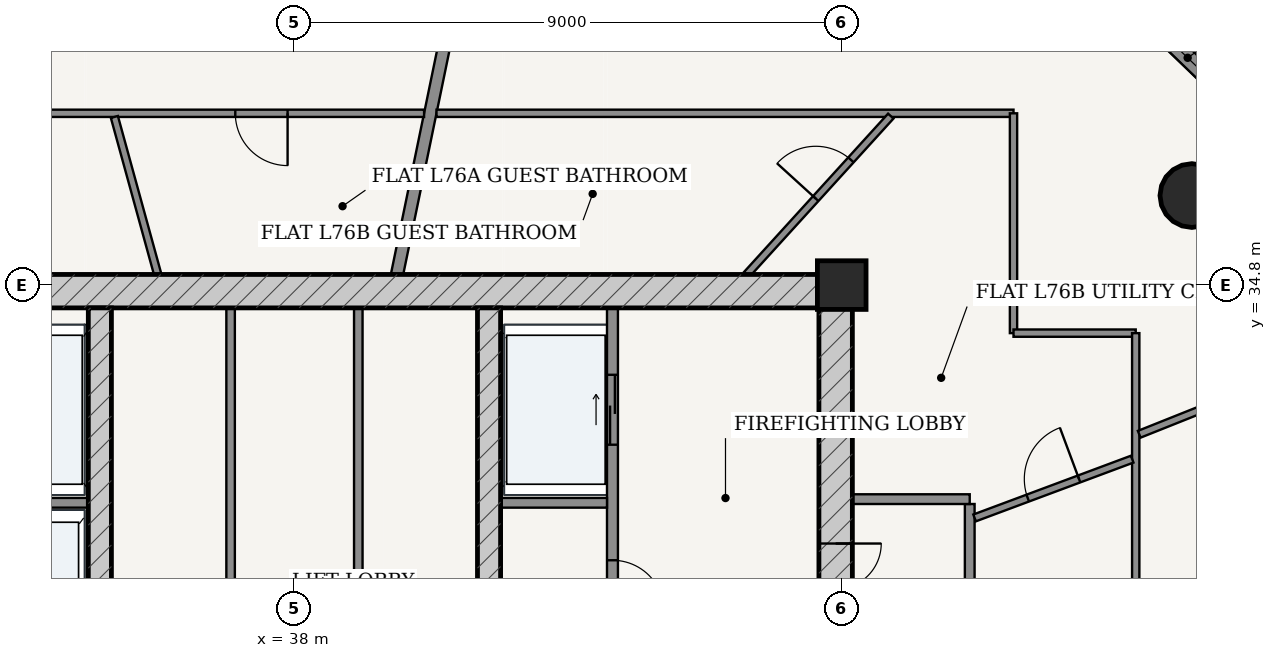
"""IFC4 building model, lengths in metres.
Left out: names, types, materials, properties, quantities, classifications, styles, units other than length and angle.
Written with IfcOpenShell. Run it as: python <this file> out.ifc"""

import sys

from ifc_helpers import new_model, si_unit, direction, frame, frame_2d, origin, origin_2d, place, context, subcontext, project, spatial, rectangle, hollow_circle, extrude, source, transform, mapped, element, fill, save


model = new_model("IFC4")
c1 = context("Model", 3, precision=1e-05, world=origin(), true_north=direction((-0.2419218956, 0.970295726276)))
c2 = subcontext(c1, "Body", "Model", "MODEL_VIEW")
j1 = project(units=[si_unit("LENGTHUNIT", "METRE"), si_unit("PLANEANGLEUNIT", "RADIAN")], contexts=[c1])
p1 = place(None, origin())
s1 = spatial("IfcSite", under=j1, at=p1, CompositionType="ELEMENT")
p2 = place(p1, origin())
s2 = spatial("IfcBuilding", under=s1, at=p2, CompositionType="ELEMENT")
p3 = place(p2, frame((0.0, 0.0, 289.45)))
s3 = spatial("IfcBuildingStorey", under=s2, at=p3, CompositionType="ELEMENT", Elevation=289.45)
p4 = place(p3, frame((47.0, 34.8, 0.0), z_axis=(0.0, 0.0, 1.0), x_axis=(1.0, 0.0, 0.0)))
e1 = element("IfcColumn", 1, at=p4, inside=s3, PredefinedType="COLUMN", context=c2, shape_type="SweptSolid", body=[
    extrude(rectangle(XDim=0.8, YDim=0.8, at=origin_2d()), origin(), (0.0, 0.0, 1.0), 3.75),
])
p5 = place(p3, frame((28.825, 34.7, 0.0), z_axis=(0.0, 0.0, 1.0), x_axis=(1.0, 0.0, 0.0)))
e2 = element("IfcWall", 2, at=p5, inside=s3, PredefinedType="SHEAR", context=c2, shape_type="SweptSolid", body=[
    extrude(rectangle(XDim=18.35, YDim=0.55, at=frame_2d((9.175, 0.0))), origin(), (0.0, 0.0, 1.0), 3.49),
])
p6 = place(p3, frame((46.9, 19.175, 0.0), z_axis=(0.0, 0.0, 1.0), x_axis=(0.0, 1.0, 0.0)))
e3 = element("IfcWall", 3, at=p6, inside=s3, PredefinedType="SHEAR", context=c2, shape_type="SweptSolid", body=[
    extrude(rectangle(XDim=15.25, YDim=0.55, at=frame_2d((7.625, 0.0))), origin(), (0.0, 0.0, 1.0), 3.49),
])
p7 = place(p6, frame((9.875, 0.0, 0.0)))
e4 = element("IfcOpeningElement", 4, at=p7, cuts=e3, PredefinedType="OPENING", context=c2, shape_type="SweptSolid", body=[
    extrude(rectangle(XDim=1.5, YDim=2.2, at=frame_2d((0.75, 1.1))), frame((0.0, 0.285, 0.0), z_axis=(0.0, -1.0, 0.0), x_axis=(1.0, 0.0, 0.0)), (0.0, 0.0, 1.0), 0.57),
])
p8 = place(p3, frame((34.8, 19.175, 0.0), z_axis=(0.0, 0.0, 1.0), x_axis=(0.0, 1.0, 0.0)))
e5 = element("IfcWall", 5, at=p8, inside=s3, PredefinedType="SHEAR", context=c2, shape_type="SweptSolid", body=[
    extrude(rectangle(XDim=15.25, YDim=0.38, at=frame_2d((7.625, 0.0))), origin(), (0.0, 0.0, 1.0), 3.49),
])
p9 = place(p8, frame((7.8, 0.0, 0.0)))
e6 = element("IfcOpeningElement", 6, at=p9, cuts=e5, PredefinedType="OPENING", context=c2, shape_type="SweptSolid", body=[
    extrude(rectangle(XDim=1.05, YDim=2.15, at=frame_2d((0.525, 1.075))), frame((0.0, 0.2, 0.0), z_axis=(0.0, -1.0, 0.0), x_axis=(1.0, 0.0, 0.0)), (0.0, 0.0, 1.0), 0.4),
])
p10 = place(p3, frame((41.2, 19.175, 0.0), z_axis=(0.0, 0.0, 1.0), x_axis=(0.0, 1.0, 0.0)))
e7 = element("IfcWall", 7, at=p10, inside=s3, PredefinedType="SHEAR", context=c2, shape_type="SweptSolid", body=[
    extrude(rectangle(XDim=15.25, YDim=0.38, at=frame_2d((7.625, 0.0))), origin(), (0.0, 0.0, 1.0), 3.49),
])
p11 = place(p10, frame((7.8, 0.0, 0.0)))
e8 = element("IfcOpeningElement", 8, at=p11, cuts=e7, PredefinedType="OPENING", context=c2, shape_type="SweptSolid", body=[
    extrude(rectangle(XDim=1.05, YDim=2.15, at=frame_2d((0.525, 1.075))), frame((0.0, 0.2, 0.0), z_axis=(0.0, -1.0, 0.0), x_axis=(1.0, 0.0, 0.0)), (0.0, 0.0, 1.0), 0.4),
])
p12 = place(p3, frame((52.759, 36.272, 0.0), z_axis=(0.0, 0.0, 1.0), x_axis=(1.0, 0.0, 0.0)))
e9 = element("IfcColumn", 9, at=p12, inside=s3, PredefinedType="COLUMN", context=c2, shape_type="SweptSolid", body=[
    extrude(hollow_circle(Radius=0.525, WallThickness=0.035, at=origin_2d()), origin(), (0.0, 0.0, 1.0), 3.75),
])
p13 = place(p3, frame((54.163, 37.117, 0.0), z_axis=(0.0, 0.0, 1.0), x_axis=(-0.719979309073, 0.693995529169, 0.0)))
e10 = element("IfcWall", 10, at=p13, inside=s3, PredefinedType="SOLIDWALL", context=c2, shape_type="SweptSolid", body=[
    extrude(rectangle(XDim=7.583, YDim=0.28, at=frame_2d((3.791, 0.0))), origin(), (0.0, 0.0, 1.0), 3.49),
])
p14 = place(p13, frame((1.272, 0.0, 0.85)))
e11 = element("IfcOpeningElement", 11, at=p14, cuts=e10, PredefinedType="OPENING", context=c2, shape_type="SweptSolid", body=[
    extrude(rectangle(XDim=1.55, YDim=1.95, at=frame_2d((0.775, 0.975))), frame((0.0, 0.15, 0.0), z_axis=(0.0, -1.0, 0.0), x_axis=(1.0, 0.0, 0.0)), (0.0, 0.0, 1.0), 0.3),
])
p15 = place(p13, frame((4.76, 0.0, 0.85)))
e12 = element("IfcOpeningElement", 12, at=p15, cuts=e10, PredefinedType="OPENING", context=c2, shape_type="SweptSolid", body=[
    extrude(rectangle(XDim=1.55, YDim=1.95, at=frame_2d((0.775, 0.975))), frame((0.0, 0.15, 0.0), z_axis=(0.0, -1.0, 0.0), x_axis=(1.0, 0.0, 0.0)), (0.0, 0.0, 1.0), 0.3),
])
p16 = place(p3, frame((32.86, 31.22, 0.0), z_axis=(0.0, 0.0, 1.0), x_axis=(1.0, 0.0, 0.0)))
e13 = element("IfcWall", 13, at=p16, inside=s3, PredefinedType="PARTITIONING", context=c2, shape_type="SweptSolid", body=[
    extrude(rectangle(XDim=1.75, YDim=0.16, at=frame_2d((0.875, 0.0))), origin(), (0.0, 0.0, 1.0), 3.49),
])
p17 = place(p3, frame((43.23, 28.52, 0.0), z_axis=(0.0, 0.0, 1.0), x_axis=(0.0, 1.0, 0.0)))
e14 = element("IfcWall", 14, at=p17, inside=s3, PredefinedType="PARTITIONING", context=c2, shape_type="SweptSolid", body=[
    extrude(rectangle(XDim=5.905, YDim=0.18, at=frame_2d((2.953, 0.0))), origin(), (0.0, 0.0, 1.0), 3.49),
])
p18 = place(p17, frame((0.905, 0.0, 0.0)))
e15 = element("IfcOpeningElement", 15, at=p18, cuts=e14, PredefinedType="OPENING", context=c2, shape_type="SweptSolid", body=[
    extrude(rectangle(XDim=0.85, YDim=2.1, at=frame_2d((0.425, 1.05))), frame((0.0, 0.1, 0.0), z_axis=(0.0, -1.0, 0.0), x_axis=(1.0, 0.0, 0.0)), (0.0, 0.0, 1.0), 0.2),
])
p19 = place(p17, frame((3.655, 0.0, 0.0)))
e16 = element("IfcOpeningElement", 16, at=p19, cuts=e14, PredefinedType="OPENING", context=c2, shape_type="SweptSolid", body=[
    extrude(rectangle(XDim=1.15, YDim=2.2, at=frame_2d((0.575, 1.1))), frame((0.0, 0.1, 0.0), z_axis=(0.0, -1.0, 0.0), x_axis=(1.0, 0.0, 0.0)), (0.0, 0.0, 1.0), 0.2),
])
p20 = place(p3, frame((41.39, 31.22, 0.0), z_axis=(0.0, 0.0, 1.0), x_axis=(1.0, 0.0, 0.0)))
e17 = element("IfcWall", 17, at=p20, inside=s3, PredefinedType="PARTITIONING", context=c2, shape_type="SweptSolid", body=[
    extrude(rectangle(XDim=1.75, YDim=0.16, at=frame_2d((0.875, 0.0))), origin(), (0.0, 0.0, 1.0), 3.49),
])
for number, where, z_axis, x_axis in (
    (18, (36.95, 28.56, 0.0), (0.0, 0.0, 1.0), (0.0, 1.0, 0.0)),
    (19, (39.05, 28.56, 0.0), (0.0, 0.0, 1.0), (0.0, 1.0, 0.0)),
):
    element("IfcWall", number, at=place(p3, frame(where, z_axis=z_axis, x_axis=x_axis)), inside=s3, PredefinedType="PARTITIONING", context=c2, shape_type="SweptSolid", body=[
        extrude(rectangle(XDim=5.865, YDim=0.14, at=frame_2d((2.933, 0.0))), origin(), (0.0, 0.0, 1.0), 3.49),
    ])
p21 = place(p3, frame((49.105, 17.275, 0.0), z_axis=(0.0, 0.0, 1.0), x_axis=(0.0, 1.0, 0.0)))
e20 = element("IfcWall", 20, at=p21, inside=s3, PredefinedType="PARTITIONING", context=c2, shape_type="SweptSolid", body=[
    extrude(rectangle(XDim=13.925, YDim=0.16, at=frame_2d((6.962, 0.0))), origin(), (0.0, 0.0, 1.0), 3.015),
])
p22 = place(p3, frame((47.175, 31.28, 0.0), z_axis=(0.0, 0.0, 1.0), x_axis=(1.0, 0.0, 0.0)))
e21 = element("IfcWall", 21, at=p22, inside=s3, PredefinedType="PARTITIONING", context=c2, shape_type="SweptSolid", body=[
    extrude(rectangle(XDim=1.93, YDim=0.16, at=frame_2d((0.965, 0.0))), origin(), (0.0, 0.0, 1.0), 3.49),
])
p23 = place(p3, frame((39.688, 34.977, 0.0), z_axis=(0.0, 0.0, 1.0), x_axis=(0.202091890364, 0.979366564596, 0.0)))
e22 = element("IfcWall", 22, at=p23, inside=s3, PredefinedType="PARTITIONING", context=c2, shape_type="SweptSolid", body=[
    extrude(rectangle(XDim=10.278, YDim=0.2, at=frame_2d((5.139, 0.0))), origin(), (0.0, 0.0, 1.0), 2.575),
])
p24 = place(p3, frame((26.175, 37.625, 0.0), z_axis=(0.0, 0.0, 1.0), x_axis=(1.0, 0.0, 0.0)))
e23 = element("IfcWall", 23, at=p24, inside=s3, PredefinedType="PARTITIONING", context=c2, shape_type="SweptSolid", body=[
    extrude(rectangle(XDim=13.957, YDim=0.12, at=frame_2d((6.979, 0.0))), origin(), (0.0, 0.0, 1.0), 3.015),
])
p25 = place(p24, frame((10.852, 0.0, 0.0)))
e24 = element("IfcOpeningElement", 24, at=p25, cuts=e23, PredefinedType="OPENING", context=c2, shape_type="SweptSolid", body=[
    extrude(rectangle(XDim=0.86, YDim=2.15, at=frame_2d((0.43, 1.075))), frame((0.0, 0.07, 0.0), z_axis=(0.0, -1.0, 0.0), x_axis=(1.0, 0.0, 0.0)), (0.0, 0.0, 1.0), 0.14),
])
p26 = place(p24, frame((4.183, 0.0, 0.0)))
e25 = element("IfcOpeningElement", 25, at=p26, cuts=e23, PredefinedType="OPENING", context=c2, shape_type="SweptSolid", body=[
    extrude(rectangle(XDim=0.9, YDim=2.15, at=frame_2d((0.45, 1.075))), frame((0.0, 0.07, 0.0), z_axis=(0.0, -1.0, 0.0), x_axis=(1.0, 0.0, 0.0)), (0.0, 0.0, 1.0), 0.14),
])
p27 = place(p3, frame((35.751, 34.977, 0.0), z_axis=(0.0, 0.0, 1.0), x_axis=(-0.26521778697, 0.964188532122, 0.0)))
e26 = element("IfcWall", 26, at=p27, inside=s3, PredefinedType="PARTITIONING", context=c2, shape_type="SweptSolid", body=[
    extrude(rectangle(XDim=2.684, YDim=0.12, at=frame_2d((1.342, 0.0))), origin(), (0.0, 0.0, 1.0), 2.575),
])
p28 = place(p3, frame((40.336, 37.625, 0.0), z_axis=(0.0, 0.0, 1.0), x_axis=(1.0, 0.0, 0.0)))
e27 = element("IfcWall", 27, at=p28, inside=s3, PredefinedType="PARTITIONING", context=c2, shape_type="SweptSolid", body=[
    extrude(rectangle(XDim=9.489, YDim=0.12, at=frame_2d((4.745, 0.0))), origin(), (0.0, 0.0, 1.0), 3.015),
])
p29 = place(p3, frame((49.825, 37.625, 0.0), z_axis=(0.0, 0.0, 1.0), x_axis=(0.0, -1.0, 0.0)))
e28 = element("IfcWall", 28, at=p29, inside=s3, PredefinedType="PARTITIONING", context=c2, shape_type="SweptSolid", body=[
    extrude(rectangle(XDim=3.615, YDim=0.12, at=frame_2d((1.808, 0.0))), origin(), (0.0, 0.0, 1.0), 3.015),
])
p30 = place(p3, frame((49.825, 34.01, 0.0), z_axis=(0.0, 0.0, 1.0), x_axis=(1.0, 0.0, 0.0)))
e29 = element("IfcWall", 29, at=p30, inside=s3, PredefinedType="PARTITIONING", context=c2, shape_type="SweptSolid", body=[
    extrude(rectangle(XDim=2.01, YDim=0.12, at=frame_2d((1.005, 0.0))), origin(), (0.0, 0.0, 1.0), 3.209),
])
p31 = place(p3, frame((51.835, 34.01, 0.0), z_axis=(0.0, 0.0, 1.0), x_axis=(0.0, -1.0, 0.0)))
e30 = element("IfcWall", 30, at=p31, inside=s3, PredefinedType="PARTITIONING", context=c2, shape_type="SweptSolid", body=[
    extrude(rectangle(XDim=19.545, YDim=0.12, at=frame_2d((9.772, 0.0))), origin(), (0.0, 0.0, 1.0), 3.015),
])
p32 = place(p31, frame((14.768, 0.0, 0.0)))
e31 = element("IfcOpeningElement", 31, at=p32, cuts=e30, PredefinedType="OPENING", context=c2, shape_type="SweptSolid", body=[
    extrude(rectangle(XDim=0.9, YDim=2.15, at=frame_2d((0.45, 1.075))), frame((0.0, 0.07, 0.0), z_axis=(0.0, -1.0, 0.0), x_axis=(1.0, 0.0, 0.0)), (0.0, 0.0, 1.0), 0.14),
])
p33 = place(p31, frame((8.718, 0.0, 0.0)))
e32 = element("IfcOpeningElement", 32, at=p33, cuts=e30, PredefinedType="OPENING", context=c2, shape_type="SweptSolid", body=[
    extrude(rectangle(XDim=0.9, YDim=2.15, at=frame_2d((0.45, 1.075))), frame((0.0, 0.07, 0.0), z_axis=(0.0, -1.0, 0.0), x_axis=(1.0, 0.0, 0.0)), (0.0, 0.0, 1.0), 0.14),
])
p34 = place(p31, frame((4.14, 0.0, 0.0)))
e33 = element("IfcOpeningElement", 33, at=p34, cuts=e30, PredefinedType="OPENING", context=c2, shape_type="SweptSolid", body=[
    extrude(rectangle(XDim=0.9, YDim=2.15, at=frame_2d((0.45, 1.075))), frame((0.0, 0.07, 0.0), z_axis=(0.0, -1.0, 0.0), x_axis=(1.0, 0.0, 0.0)), (0.0, 0.0, 1.0), 0.14),
])
p35 = place(p3, frame((51.893, 32.347, 0.0), z_axis=(0.0, 0.0, 1.0), x_axis=(0.928712556691, 0.370800467966, 0.0)))
e34 = element("IfcWall", 34, at=p35, inside=s3, PredefinedType="PARTITIONING", context=c2, shape_type="SweptSolid", body=[
    extrude(rectangle(XDim=4.28, YDim=0.12, at=frame_2d((2.14, 0.0))), origin(), (0.0, 0.0, 1.0), 3.121),
])
p36 = place(p35, frame((1.69, 0.0, 0.0)))
e35 = element("IfcOpeningElement", 35, at=p36, cuts=e34, PredefinedType="OPENING", context=c2, shape_type="SweptSolid", body=[
    extrude(rectangle(XDim=0.9, YDim=2.15, at=frame_2d((0.45, 1.075))), frame((0.0, 0.07, 0.0), z_axis=(0.0, -1.0, 0.0), x_axis=(1.0, 0.0, 0.0)), (0.0, 0.0, 1.0), 0.14),
])
p37 = place(p3, frame((49.185, 30.971, 0.0), z_axis=(0.0, 0.0, 1.0), x_axis=(0.93696600231, 0.349420535338, 0.0)))
e36 = element("IfcWall", 36, at=p37, inside=s3, PredefinedType="PARTITIONING", context=c2, shape_type="SweptSolid", body=[
    extrude(rectangle(XDim=2.766, YDim=0.12, at=frame_2d((1.383, 0.0))), origin(), (0.0, 0.0, 1.0), 3.209),
])
p38 = place(p37, frame((0.933, 0.0, 0.0)))
e37 = element("IfcOpeningElement", 37, at=p38, cuts=e36, PredefinedType="OPENING", context=c2, shape_type="SweptSolid", body=[
    extrude(rectangle(XDim=0.9, YDim=2.15, at=frame_2d((0.45, 1.075))), frame((0.0, 0.07, 0.0), z_axis=(0.0, -1.0, 0.0), x_axis=(1.0, 0.0, 0.0)), (0.0, 0.0, 1.0), 0.14),
])
p39 = place(p3, frame((45.439, 34.977, 0.0), z_axis=(0.0, 0.0, 1.0), x_axis=(0.672980108938, 0.739660579573, 0.0)))
e38 = element("IfcWall", 38, at=p39, inside=s3, PredefinedType="PARTITIONING", context=c2, shape_type="SweptSolid", body=[
    extrude(rectangle(XDim=3.519, YDim=0.12, at=frame_2d((1.759, 0.0))), origin(), (0.0, 0.0, 1.0), 3.015),
])
p40 = place(p39, frame((1.685, 0.0, 0.0)))
e39 = element("IfcOpeningElement", 39, at=p40, cuts=e38, PredefinedType="OPENING", context=c2, shape_type="SweptSolid", body=[
    extrude(rectangle(XDim=0.86, YDim=2.15, at=frame_2d((0.43, 1.075))), frame((0.0, 0.07, 0.0), z_axis=(0.0, -1.0, 0.0), x_axis=(1.0, 0.0, 0.0)), (0.0, 0.0, 1.0), 0.14),
])
m1 = source(origin(), c2, "Body", "SweptSolid", [
    extrude(rectangle(XDim=1.55, YDim=1.95, at=frame_2d((0.775, 0.975))), frame((0.0, 0.03, 0.0), z_axis=(0.0, -1.0, 0.0), x_axis=(1.0, 0.0, 0.0)), (0.0, 0.0, 1.0), 0.06),
])
p41 = place(p14, origin())
e40 = element("IfcWindow", 40, at=p41, inside=s3, PartitioningType="SINGLE_PANEL", PredefinedType="WINDOW", context=c2, shape_type="MappedRepresentation", body=[
    mapped(m1, transform((0.0, 0.0, 0.0), scale=1.0)),
])
fill(e11, e40)
m2 = source(origin(), c2, "Body", "SweptSolid", [
    extrude(rectangle(XDim=1.5, YDim=2.2, at=frame_2d((0.75, 1.1))), frame((0.0, 0.025, 0.0), z_axis=(0.0, -1.0, 0.0), x_axis=(1.0, 0.0, 0.0)), (0.0, 0.0, 1.0), 0.05),
])
p42 = place(p7, frame((1.5, 0.0, 0.0), z_axis=(0.0, 0.0, 1.0), x_axis=(-1.0, 0.0, 0.0)))
e41 = element("IfcDoor", 41, at=p42, inside=s3, OperationType="DOUBLE_DOOR_SINGLE_SWING", PredefinedType="DOOR", context=c2, shape_type="MappedRepresentation", body=[
    mapped(m2, transform((0.0, 0.0, 0.0), scale=1.0)),
])
fill(e4, e41)
m3 = source(origin(), c2, "Body", "SweptSolid", [
    extrude(rectangle(XDim=0.85, YDim=2.1, at=frame_2d((0.425, 1.05))), frame((0.0, 0.025, 0.0), z_axis=(0.0, -1.0, 0.0), x_axis=(1.0, 0.0, 0.0)), (0.0, 0.0, 1.0), 0.05),
])
p43 = place(p18, frame((0.85, 0.0, 0.0), z_axis=(0.0, 0.0, 1.0), x_axis=(-1.0, 0.0, 0.0)))
e42 = element("IfcDoor", 42, at=p43, inside=s3, OperationType="SINGLE_SWING_RIGHT", PredefinedType="DOOR", context=c2, shape_type="MappedRepresentation", body=[
    mapped(m3, transform((0.0, 0.0, 0.0), scale=1.0)),
])
fill(e15, e42)
m4 = source(origin(), c2, "Body", "SweptSolid", [
    extrude(rectangle(XDim=1.15, YDim=2.2, at=frame_2d((0.575, 1.1))), frame((0.0, 0.025, 0.0), z_axis=(0.0, -1.0, 0.0), x_axis=(1.0, 0.0, 0.0)), (0.0, 0.0, 1.0), 0.05),
])
p44 = place(p19, origin())
e43 = element("IfcDoor", 43, at=p44, inside=s3, OperationType="DOUBLE_DOOR_SLIDING", PredefinedType="DOOR", context=c2, shape_type="MappedRepresentation", body=[
    mapped(m4, transform((0.0, 0.0, 0.0), scale=1.0)),
])
fill(e16, e43)
m5 = source(origin(), c2, "Body", "SweptSolid", [
    extrude(rectangle(XDim=0.86, YDim=2.15, at=frame_2d((0.43, 1.075))), frame((0.0, 0.025, 0.0), z_axis=(0.0, -1.0, 0.0), x_axis=(1.0, 0.0, 0.0)), (0.0, 0.0, 1.0), 0.05),
])
p45 = place(p25, frame((0.86, 0.0, 0.0), z_axis=(0.0, 0.0, 1.0), x_axis=(-1.0, 0.0, 0.0)))
e44 = element("IfcDoor", 44, at=p45, inside=s3, OperationType="SINGLE_SWING_LEFT", PredefinedType="DOOR", context=c2, shape_type="MappedRepresentation", body=[
    mapped(m5, transform((0.0, 0.0, 0.0), scale=1.0)),
])
fill(e24, e44)
m6 = source(origin(), c2, "Body", "SweptSolid", [
    extrude(rectangle(XDim=0.9, YDim=2.15, at=frame_2d((0.45, 1.075))), frame((0.0, 0.025, 0.0), z_axis=(0.0, -1.0, 0.0), x_axis=(1.0, 0.0, 0.0)), (0.0, 0.0, 1.0), 0.05),
])
p46 = place(p38, origin())
e45 = element("IfcDoor", 45, at=p46, inside=s3, OperationType="SINGLE_SWING_RIGHT", PredefinedType="DOOR", context=c2, shape_type="MappedRepresentation", body=[
    mapped(m6, transform((0.0, 0.0, 0.0), scale=1.0)),
])
fill(e37, e45)
p47 = place(p40, origin())
e46 = element("IfcDoor", 46, at=p47, inside=s3, OperationType="SINGLE_SWING_LEFT", PredefinedType="DOOR", context=c2, shape_type="MappedRepresentation", body=[
    mapped(m5, transform((0.0, 0.0, 0.0), scale=1.0)),
])
fill(e39, e46)
save(model, sys.argv[1])
